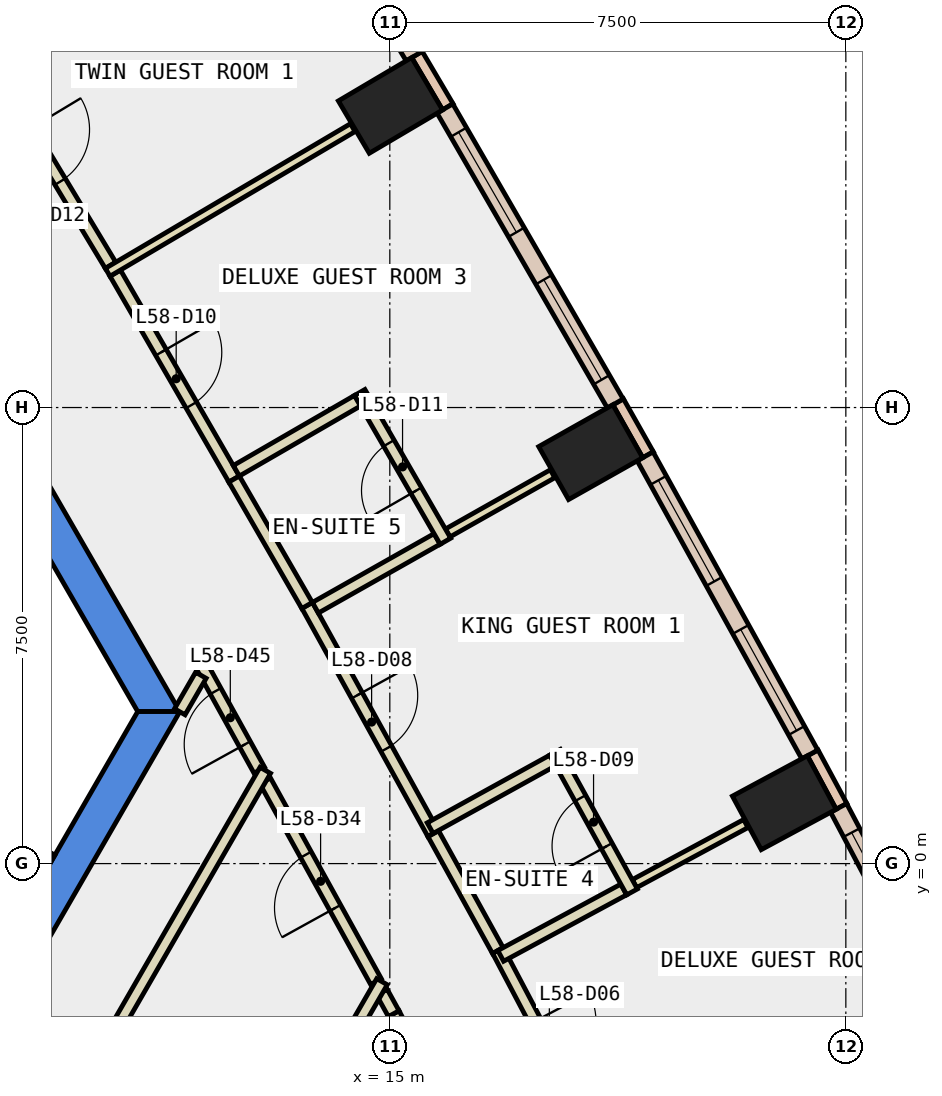
"""IFC4 building model, lengths in metres.
Left out: names, types, materials, properties, quantities, classifications, styles, units other than length and angle.
Written with IfcOpenShell. Run it as: python <this file> out.ifc"""

import sys

from ifc_helpers import new_model, si_unit, direction, frame, frame_2d, origin, origin_2d, place, context, subcontext, project, spatial, polyline, rectangle, outline, extrude, element, fill, save


model = new_model("IFC4")
c1 = context("Model", 3, precision=1e-05, world=origin(), true_north=direction((0.0, 1.0)))
c2 = subcontext(c1, "Body", "Model", "MODEL_VIEW")
j1 = project(units=[si_unit("LENGTHUNIT", "METRE"), si_unit("PLANEANGLEUNIT", "RADIAN")], contexts=[c1])
p1 = place(None, origin())
s1 = spatial("IfcSite", under=j1, at=p1, CompositionType="ELEMENT")
p2 = place(p1, origin())
s2 = spatial("IfcBuilding", under=s1, at=p2, CompositionType="ELEMENT")
p3 = place(p2, frame((0.0, 0.0, 255.8)))
s3 = spatial("IfcBuildingStorey", under=s2, at=p3, CompositionType="ELEMENT", Elevation=255.8)
for number, where, z_axis, x_axis in (
    (1, (21.488, 1.001, -0.34), (0.0, 0.0, 1.0), (-0.474, 0.881, 0.0)),
    (2, (18.304, 6.766, -0.34), (0.0, 0.0, 1.0), (-0.491, 0.871, 0.0)),
    (3, (15.011, 12.468, -0.34), (0.0, 0.0, 1.0), (-0.509, 0.861, 0.0)),
):
    element("IfcColumn", number, at=place(p3, frame(where, z_axis=z_axis, x_axis=x_axis)), inside=s3, PredefinedType="COLUMN", context=c2, shape_type="SweptSolid", body=[
        extrude(rectangle(XDim=1.0, YDim=1.4, at=origin_2d()), origin(), (0.0, 0.0, 1.0), 3.6),
    ])
p4 = place(p3, frame((0.0, 0.0, -0.34)))
e4 = element("IfcWall", 4, at=p4, inside=s3, PredefinedType="SHEAR", context=c2, shape_type="SweptSolid", body=[
    extrude(outline(polyline([(6.786, 10.747), (6.266, 10.447), (10.854, 2.5), (11.547, 2.5), (6.786, 10.747)])), origin(), (0.0, 0.0, 1.0), 3.6),
])
p5 = place(p3, frame((0.0, 0.0, -0.34)))
e5 = element("IfcWall", 5, at=p5, inside=s3, PredefinedType="SHEAR", context=c2, shape_type="SweptSolid", body=[
    extrude(outline(polyline([(5.774, -7.5), (11.547, 2.5), (10.854, 2.5), (5.427, -6.9), (5.774, -7.5)])), origin(), (0.0, 0.0, 1.0), 3.6),
])
for number, where, z_axis, x_axis in (
    (6, (22.429, 0.94, 0.0), (0.0, 0.0, 1.0), (-0.474, 0.881, 0.0)),
    (7, (19.247, 6.723, 0.0), (0.0, 0.0, 1.0), (-0.492, 0.871, 0.0)),
):
    element("IfcWall", number, at=place(p3, frame(where, z_axis=z_axis, x_axis=x_axis)), inside=s3, PredefinedType="STANDARD", context=c2, shape_type="SweptSolid", body=[
        extrude(rectangle(XDim=1.0, YDim=0.2, at=frame_2d((0.5, 0.0))), origin(), (0.0, 0.0, 1.0), 3.26),
    ])
p6 = place(p3, frame((15.954, 12.445, 0.0), z_axis=(0.0, 0.0, 1.0), x_axis=(-0.508268432768, 0.861198699634, 0.0)))
e8 = element("IfcWall", 8, at=p6, inside=s3, PredefinedType="STANDARD", context=c2, shape_type="SweptSolid", body=[
    extrude(rectangle(XDim=1.0, YDim=0.2, at=frame_2d((0.5, 0.0))), origin(), (0.0, 0.0, 1.0), 3.26),
])
p7 = place(p3, frame((25.012, -4.07, 0.0), z_axis=(0.0, 0.0, 1.0), x_axis=(-0.466663589714, 0.884434900959, 0.0)))
e9 = element("IfcWall", 9, at=p7, inside=s3, PredefinedType="STANDARD", context=c2, shape_type="SweptSolid", body=[
    extrude(rectangle(XDim=5.638, YDim=0.3, at=frame_2d((2.819, 0.0))), origin(), (0.0, 0.0, 1.0), 3.26),
])
p8 = place(p7, frame((0.459, 0.0, 0.9)))
e10 = element("IfcOpeningElement", 10, at=p8, cuts=e9, PredefinedType="OPENING", context=c2, shape_type="SweptSolid", body=[
    extrude(rectangle(XDim=1.9, YDim=2.0, at=frame_2d((0.95, 1.0))), frame((0.0, 0.16, 0.0), z_axis=(0.0, -1.0, 0.0), x_axis=(1.0, 0.0, 0.0)), (0.0, 0.0, 1.0), 0.32),
])
p9 = place(p7, frame((3.278, 0.0, 0.9)))
e11 = element("IfcOpeningElement", 11, at=p9, cuts=e9, PredefinedType="OPENING", context=c2, shape_type="SweptSolid", body=[
    extrude(rectangle(XDim=1.9, YDim=2.0, at=frame_2d((0.95, 1.0))), frame((0.0, 0.16, 0.0), z_axis=(0.0, -1.0, 0.0), x_axis=(1.0, 0.0, 0.0)), (0.0, 0.0, 1.0), 0.32),
])
p10 = place(p3, frame((21.907, 1.794, 0.0), z_axis=(0.0, 0.0, 1.0), x_axis=(-0.483469062695, 0.875361448441, 0.0)))
e12 = element("IfcWall", 12, at=p10, inside=s3, PredefinedType="STANDARD", context=c2, shape_type="SweptSolid", body=[
    extrude(rectangle(XDim=5.601, YDim=0.3, at=frame_2d((2.801, 0.0))), origin(), (0.0, 0.0, 1.0), 3.26),
])
p11 = place(p10, frame((0.45, 0.0, 0.9)))
e13 = element("IfcOpeningElement", 13, at=p11, cuts=e12, PredefinedType="OPENING", context=c2, shape_type="SweptSolid", body=[
    extrude(rectangle(XDim=1.9, YDim=2.0, at=frame_2d((0.95, 1.0))), frame((0.0, 0.16, 0.0), z_axis=(0.0, -1.0, 0.0), x_axis=(1.0, 0.0, 0.0)), (0.0, 0.0, 1.0), 0.32),
])
p12 = place(p10, frame((3.251, 0.0, 0.9)))
e14 = element("IfcOpeningElement", 14, at=p12, cuts=e12, PredefinedType="OPENING", context=c2, shape_type="SweptSolid", body=[
    extrude(rectangle(XDim=1.9, YDim=2.0, at=frame_2d((0.95, 1.0))), frame((0.0, 0.16, 0.0), z_axis=(0.0, -1.0, 0.0), x_axis=(1.0, 0.0, 0.0)), (0.0, 0.0, 1.0), 0.32),
])
p13 = place(p3, frame((18.708, 7.566, 0.0), z_axis=(0.0, 0.0, 1.0), x_axis=(-0.500089564757, 0.865973687372, 0.0)))
e15 = element("IfcWall", 15, at=p13, inside=s3, PredefinedType="STANDARD", context=c2, shape_type="SweptSolid", body=[
    extrude(rectangle(XDim=5.603, YDim=0.3, at=frame_2d((2.802, 0.0))), origin(), (0.0, 0.0, 1.0), 3.26),
])
p14 = place(p13, frame((0.451, 0.0, 0.9)))
e16 = element("IfcOpeningElement", 16, at=p14, cuts=e15, PredefinedType="OPENING", context=c2, shape_type="SweptSolid", body=[
    extrude(rectangle(XDim=1.9, YDim=2.0, at=frame_2d((0.95, 1.0))), frame((0.0, 0.16, 0.0), z_axis=(0.0, -1.0, 0.0), x_axis=(1.0, 0.0, 0.0)), (0.0, 0.0, 1.0), 0.32),
])
p15 = place(p13, frame((3.252, 0.0, 0.9)))
e17 = element("IfcOpeningElement", 17, at=p15, cuts=e15, PredefinedType="OPENING", context=c2, shape_type="SweptSolid", body=[
    extrude(rectangle(XDim=1.9, YDim=2.0, at=frame_2d((0.95, 1.0))), frame((0.0, 0.16, 0.0), z_axis=(0.0, -1.0, 0.0), x_axis=(1.0, 0.0, 0.0)), (0.0, 0.0, 1.0), 0.32),
])
p16 = place(p3, frame((15.399, 13.277, 0.0), z_axis=(0.0, 0.0, 1.0), x_axis=(-0.516269519619, 0.856426169096, 0.0)))
e18 = element("IfcWall", 18, at=p16, inside=s3, PredefinedType="STANDARD", context=c2, shape_type="SweptSolid", body=[
    extrude(rectangle(XDim=5.603, YDim=0.3, at=frame_2d((2.802, 0.0))), origin(), (0.0, 0.0, 1.0), 3.26),
])
p17 = place(p16, frame((0.451, 0.0, 0.9)))
e19 = element("IfcOpeningElement", 19, at=p17, cuts=e18, PredefinedType="OPENING", context=c2, shape_type="SweptSolid", body=[
    extrude(rectangle(XDim=1.9, YDim=2.0, at=frame_2d((0.95, 1.0))), frame((0.0, 0.16, 0.0), z_axis=(0.0, -1.0, 0.0), x_axis=(1.0, 0.0, 0.0)), (0.0, 0.0, 1.0), 0.32),
])
p18 = place(p16, frame((3.253, 0.0, 0.9)))
e20 = element("IfcOpeningElement", 20, at=p18, cuts=e18, PredefinedType="OPENING", context=c2, shape_type="SweptSolid", body=[
    extrude(rectangle(XDim=1.9, YDim=2.0, at=frame_2d((0.95, 1.0))), frame((0.0, 0.16, 0.0), z_axis=(0.0, -1.0, 0.0), x_axis=(1.0, 0.0, 0.0)), (0.0, 0.0, 1.0), 0.32),
])
p19 = place(p3, frame((12.854, 1.535, 0.0), z_axis=(0.0, 0.0, 1.0), x_axis=(-0.483730980407, 0.875216738068, 0.0)))
e21 = element("IfcWall", 21, at=p19, inside=s3, PredefinedType="PARTITIONING", context=c2, shape_type="SweptSolid", body=[
    extrude(rectangle(XDim=1.974, YDim=0.2, at=frame_2d((0.987, 0.0))), origin(), (0.0, 0.0, 1.0), 3.26),
])
p20 = place(p19, frame((0.487, 0.0, 0.0)))
e22 = element("IfcOpeningElement", 22, at=p20, cuts=e21, PredefinedType="OPENING", context=c2, shape_type="SweptSolid", body=[
    extrude(rectangle(XDim=1.0, YDim=2.1, at=frame_2d((0.5, 1.05))), frame((0.0, 0.11, 0.0), z_axis=(0.0, -1.0, 0.0), x_axis=(1.0, 0.0, 0.0)), (0.0, 0.0, 1.0), 0.22),
])
p21 = place(p3, frame((11.893, 3.097, 0.0), z_axis=(0.0, 0.0, 1.0), x_axis=(-0.500911294014, -0.865498628265, 0.0)))
e23 = element("IfcWall", 23, at=p21, inside=s3, PredefinedType="PARTITIONING", context=c2, shape_type="SweptSolid", body=[
    extrude(rectangle(XDim=0.693, YDim=0.2, at=frame_2d((0.347, 0.0))), origin(), (0.0, 0.0, 1.0), 3.26),
])
p22 = place(p3, frame((14.773, -1.941, 0.0), z_axis=(0.0, 0.0, 1.0), x_axis=(-0.483431586589, 0.875382145744, 0.0)))
e24 = element("IfcWall", 24, at=p22, inside=s3, PredefinedType="PARTITIONING", context=c2, shape_type="SweptSolid", body=[
    extrude(rectangle(XDim=3.771, YDim=0.2, at=frame_2d((1.885, 0.0))), origin(), (0.0, 0.0, 1.0), 3.26),
])
p23 = place(p22, frame((1.385, 0.0, 0.0)))
e25 = element("IfcOpeningElement", 25, at=p23, cuts=e24, PredefinedType="OPENING", context=c2, shape_type="SweptSolid", body=[
    extrude(rectangle(XDim=1.0, YDim=2.1, at=frame_2d((0.5, 1.05))), frame((0.0, 0.11, 0.0), z_axis=(0.0, -1.0, 0.0), x_axis=(1.0, 0.0, 0.0)), (0.0, 0.0, 1.0), 0.22),
])
p24 = place(p3, frame((16.667, -5.505, 0.0), z_axis=(0.0, 0.0, 1.0), x_axis=(-0.466812680399, 0.884356218624, 0.0)))
e26 = element("IfcWall", 26, at=p24, inside=s3, PredefinedType="PARTITIONING", context=c2, shape_type="SweptSolid", body=[
    extrude(rectangle(XDim=3.434, YDim=0.2, at=frame_2d((1.717, 0.0))), origin(), (0.0, 0.0, 1.0), 3.26),
])
p25 = place(p24, frame((1.217, 0.0, 0.0)))
e27 = element("IfcOpeningElement", 27, at=p25, cuts=e26, PredefinedType="OPENING", context=c2, shape_type="SweptSolid", body=[
    extrude(rectangle(XDim=1.0, YDim=2.1, at=frame_2d((0.5, 1.05))), frame((0.0, 0.11, 0.0), z_axis=(0.0, -1.0, 0.0), x_axis=(1.0, 0.0, 0.0)), (0.0, 0.0, 1.0), 0.22),
])
p26 = place(p3, frame((15.064, -2.468, 0.0), z_axis=(0.0, 0.0, 1.0), x_axis=(-0.482338449744, 0.875984942735, 0.0)))
e28 = element("IfcWall", 28, at=p26, inside=s3, PredefinedType="PARTITIONING", context=c2, shape_type="SweptSolid", body=[
    extrude(rectangle(XDim=0.402, YDim=0.2, at=frame_2d((0.201, 0.0))), origin(), (0.0, 0.0, 1.0), 3.26),
])
p27 = place(p3, frame((16.778, -1.429, 0.0), z_axis=(0.0, 0.0, 1.0), x_axis=(0.466493865945, -0.884524433261, 0.0)))
e29 = element("IfcWall", 29, at=p27, inside=s3, PredefinedType="PARTITIONING", context=c2, shape_type="SweptSolid", body=[
    extrude(rectangle(XDim=3.526, YDim=0.2, at=frame_2d((1.763, 0.0))), origin(), (0.0, 0.0, 1.0), 3.26),
])
p28 = place(p27, frame((1.313, 0.0, 0.0)))
e30 = element("IfcOpeningElement", 30, at=p28, cuts=e29, PredefinedType="OPENING", context=c2, shape_type="SweptSolid", body=[
    extrude(rectangle(XDim=1.0, YDim=2.1, at=frame_2d((0.5, 1.05))), frame((0.0, 0.11, 0.0), z_axis=(0.0, -1.0, 0.0), x_axis=(1.0, 0.0, 0.0)), (0.0, 0.0, 1.0), 0.22),
])
p29 = place(p3, frame((13.641, 4.246, 0.0), z_axis=(0.0, 0.0, 1.0), x_axis=(0.483405752983, -0.875396411909, 0.0)))
e31 = element("IfcWall", 31, at=p29, inside=s3, PredefinedType="PARTITIONING", context=c2, shape_type="SweptSolid", body=[
    extrude(rectangle(XDim=4.284, YDim=0.2, at=frame_2d((2.142, 0.0))), origin(), (0.0, 0.0, 1.0), 3.26),
])
p30 = place(p29, frame((1.692, 0.0, 0.0)))
e32 = element("IfcOpeningElement", 32, at=p30, cuts=e31, PredefinedType="OPENING", context=c2, shape_type="SweptSolid", body=[
    extrude(rectangle(XDim=1.0, YDim=2.1, at=frame_2d((0.5, 1.05))), frame((0.0, 0.11, 0.0), z_axis=(0.0, -1.0, 0.0), x_axis=(1.0, 0.0, 0.0)), (0.0, 0.0, 1.0), 0.22),
])
p31 = place(p3, frame((15.715, 0.491, 0.0), z_axis=(0.0, 0.0, 1.0), x_axis=(0.483421428323, -0.875387755591, 0.0)))
e33 = element("IfcWall", 33, at=p31, inside=s3, PredefinedType="PARTITIONING", context=c2, shape_type="SweptSolid", body=[
    extrude(rectangle(XDim=2.194, YDim=0.2, at=frame_2d((1.097, 0.0))), origin(), (0.0, 0.0, 1.0), 3.26),
])
p32 = place(p3, frame((10.484, 9.71, 0.0), z_axis=(0.0, 0.0, 1.0), x_axis=(0.500034145141, -0.866005689181, 0.0)))
e34 = element("IfcWall", 34, at=p32, inside=s3, PredefinedType="PARTITIONING", context=c2, shape_type="SweptSolid", body=[
    extrude(rectangle(XDim=3.91, YDim=0.2, at=frame_2d((1.955, 0.0))), origin(), (0.0, 0.0, 1.0), 3.26),
])
p33 = place(p32, frame((1.505, 0.0, 0.0)))
e35 = element("IfcOpeningElement", 35, at=p33, cuts=e34, PredefinedType="OPENING", context=c2, shape_type="SweptSolid", body=[
    extrude(rectangle(XDim=1.0, YDim=2.1, at=frame_2d((0.5, 1.05))), frame((0.0, 0.11, 0.0), z_axis=(0.0, -1.0, 0.0), x_axis=(1.0, 0.0, 0.0)), (0.0, 0.0, 1.0), 0.22),
])
p34 = place(p3, frame((12.439, 6.324, 0.0), z_axis=(0.0, 0.0, 1.0), x_axis=(0.499913221443, -0.866075499611, 0.0)))
e36 = element("IfcWall", 36, at=p34, inside=s3, PredefinedType="PARTITIONING", context=c2, shape_type="SweptSolid", body=[
    extrude(rectangle(XDim=2.4, YDim=0.2, at=frame_2d((1.2, 0.0))), origin(), (0.0, 0.0, 1.0), 3.26),
])
p35 = place(p3, frame((8.181, 13.532, 0.0), z_axis=(0.0, 0.0, 1.0), x_axis=(0.51625987265, -0.856431984393, 0.0)))
e37 = element("IfcWall", 37, at=p35, inside=s3, PredefinedType="PARTITIONING", context=c2, shape_type="SweptSolid", body=[
    extrude(rectangle(XDim=4.312, YDim=0.2, at=frame_2d((2.156, 0.0))), origin(), (0.0, 0.0, 1.0), 3.26),
])
p36 = place(p35, frame((1.706, 0.0, 0.0)))
e38 = element("IfcOpeningElement", 38, at=p36, cuts=e37, PredefinedType="OPENING", context=c2, shape_type="SweptSolid", body=[
    extrude(rectangle(XDim=1.0, YDim=2.1, at=frame_2d((0.5, 1.05))), frame((0.0, 0.11, 0.0), z_axis=(0.0, -1.0, 0.0), x_axis=(1.0, 0.0, 0.0)), (0.0, 0.0, 1.0), 0.22),
])
p37 = place(p3, frame((8.141, 0.801, 0.0), z_axis=(0.0, 0.0, 1.0), x_axis=(0.866434738017, -0.499290341141, 0.0)))
e39 = element("IfcWall", 39, at=p37, inside=s3, PredefinedType="PARTITIONING", context=c2, shape_type="SweptSolid", body=[
    extrude(rectangle(XDim=1.5, YDim=0.2, at=frame_2d((0.75, 0.0))), origin(), (0.0, 0.0, 1.0), 3.26),
])
p38 = place(p3, frame((9.285, -4.818, 0.0), z_axis=(0.0, 0.0, 1.0), x_axis=(0.499962569651, 0.866047013128, 0.0)))
e40 = element("IfcWall", 40, at=p38, inside=s3, PredefinedType="PARTITIONING", context=c2, shape_type="SweptSolid", body=[
    extrude(rectangle(XDim=7.334, YDim=0.2, at=frame_2d((3.667, 0.0))), origin(), (0.0, 0.0, 1.0), 3.26),
])
p39 = place(p3, frame((14.871, -1.942, 0.0), z_axis=(0.0, 0.0, 1.0), x_axis=(-0.50000507839, -0.866022471755, 0.0)))
e41 = element("IfcWall", 41, at=p39, inside=s3, PredefinedType="PARTITIONING", context=c2, shape_type="SweptSolid", body=[
    extrude(rectangle(XDim=5.284, YDim=0.2, at=frame_2d((2.642, 0.0))), origin(), (0.0, 0.0, 1.0), 3.26),
])
p40 = place(p3, frame((19.023, -0.33, 0.0), z_axis=(0.0, 0.0, 1.0), x_axis=(0.880158309515, 0.474680261009, 0.0)))
e42 = element("IfcWall", 42, at=p40, inside=s3, PredefinedType="PARTITIONING", context=c2, shape_type="SweptSolid", body=[
    extrude(rectangle(XDim=2.082, YDim=0.15, at=frame_2d((1.041, 0.0))), origin(), (0.0, 0.0, 1.0), 3.26),
])
p41 = place(p3, frame((16.824, -1.518, 0.0), z_axis=(0.0, 0.0, 1.0), x_axis=(0.87996932648, 0.475030508972, 0.0)))
e43 = element("IfcWall", 43, at=p41, inside=s3, PredefinedType="PARTITIONING", context=c2, shape_type="SweptSolid", body=[
    extrude(rectangle(XDim=2.299, YDim=0.2, at=frame_2d((1.149, 0.0))), origin(), (0.0, 0.0, 1.0), 3.26),
])
p42 = place(p3, frame((18.984, -0.466, 0.0), z_axis=(0.0, 0.0, 1.0), x_axis=(-0.482922337539, 0.875663186337, 0.0)))
e44 = element("IfcWall", 44, at=p42, inside=s3, PredefinedType="PARTITIONING", context=c2, shape_type="SweptSolid", body=[
    extrude(rectangle(XDim=2.623, YDim=0.2, at=frame_2d((1.312, 0.0))), origin(), (0.0, 0.0, 1.0), 3.26),
])
p43 = place(p42, frame((0.861, 0.0, 0.0)))
e45 = element("IfcOpeningElement", 45, at=p43, cuts=e44, PredefinedType="OPENING", context=c2, shape_type="SweptSolid", body=[
    extrude(rectangle(XDim=0.9, YDim=2.1, at=frame_2d((0.45, 1.05))), frame((0.0, 0.11, 0.0), z_axis=(0.0, -1.0, 0.0), x_axis=(1.0, 0.0, 0.0)), (0.0, 0.0, 1.0), 0.22),
])
p44 = place(p3, frame((17.677, 1.695, 0.0), z_axis=(0.0, 0.0, 1.0), x_axis=(-0.875306576455, -0.483568399727, 0.0)))
e46 = element("IfcWall", 46, at=p44, inside=s3, PredefinedType="PARTITIONING", context=c2, shape_type="SweptSolid", body=[
    extrude(rectangle(XDim=2.3, YDim=0.2, at=frame_2d((1.15, 0.0))), origin(), (0.0, 0.0, 1.0), 3.26),
])
p45 = place(p3, frame((15.952, 5.437, 0.0), z_axis=(0.0, 0.0, 1.0), x_axis=(0.870817501488, 0.491606427036, 0.0)))
e47 = element("IfcWall", 47, at=p45, inside=s3, PredefinedType="PARTITIONING", context=c2, shape_type="SweptSolid", body=[
    extrude(rectangle(XDim=1.981, YDim=0.15, at=frame_2d((0.99, 0.0))), origin(), (0.0, 0.0, 1.0), 3.26),
])
p46 = place(p3, frame((13.776, 4.208, 0.0), z_axis=(0.0, 0.0, 1.0), x_axis=(0.870669592898, 0.491868336044, 0.0)))
e48 = element("IfcWall", 48, at=p46, inside=s3, PredefinedType="PARTITIONING", context=c2, shape_type="SweptSolid", body=[
    extrude(rectangle(XDim=2.3, YDim=0.2, at=frame_2d((1.15, 0.0))), origin(), (0.0, 0.0, 1.0), 3.26),
])
p47 = place(p3, frame((15.915, 5.301, 0.0), z_axis=(0.0, 0.0, 1.0), x_axis=(-0.499709979351, 0.866192782547, 0.0)))
e49 = element("IfcWall", 49, at=p47, inside=s3, PredefinedType="PARTITIONING", context=c2, shape_type="SweptSolid", body=[
    extrude(rectangle(XDim=2.824, YDim=0.2, at=frame_2d((1.412, 0.0))), origin(), (0.0, 0.0, 1.0), 3.26),
])
p48 = place(p47, frame((0.962, 0.0, 0.0)))
e50 = element("IfcOpeningElement", 50, at=p48, cuts=e49, PredefinedType="OPENING", context=c2, shape_type="SweptSolid", body=[
    extrude(rectangle(XDim=0.9, YDim=2.1, at=frame_2d((0.45, 1.05))), frame((0.0, 0.11, 0.0), z_axis=(0.0, -1.0, 0.0), x_axis=(1.0, 0.0, 0.0)), (0.0, 0.0, 1.0), 0.22),
])
p49 = place(p3, frame((14.467, 7.611, 0.0), z_axis=(0.0, 0.0, 1.0), x_axis=(-0.865716862402, -0.500534028967, 0.0)))
e51 = element("IfcWall", 51, at=p49, inside=s3, PredefinedType="PARTITIONING", context=c2, shape_type="SweptSolid", body=[
    extrude(rectangle(XDim=2.3, YDim=0.2, at=frame_2d((1.15, 0.0))), origin(), (0.0, 0.0, 1.0), 3.26),
])
p50 = place(p3, frame((10.36, 9.724, 0.0), z_axis=(0.0, 0.0, 1.0), x_axis=(0.861211954005, 0.508245974188, 0.0)))
e52 = element("IfcWall", 52, at=p50, inside=s3, PredefinedType="PARTITIONING", context=c2, shape_type="SweptSolid", body=[
    extrude(rectangle(XDim=4.681, YDim=0.15, at=frame_2d((2.34, 0.0))), origin(), (0.0, 0.0, 1.0), 3.26),
])
p51 = place(p9, origin())
e53 = element("IfcWindow", 53, at=p51, inside=s3, PartitioningType="SINGLE_PANEL", PredefinedType="WINDOW", context=c2, shape_type="SweptSolid", body=[
    extrude(rectangle(XDim=1.9, YDim=2.0, at=frame_2d((0.95, 1.0))), frame((0.0, 0.03, 0.0), z_axis=(0.0, -1.0, 0.0), x_axis=(1.0, 0.0, 0.0)), (0.0, 0.0, 1.0), 0.06),
])
fill(e11, e53)
p52 = place(p11, origin())
e54 = element("IfcWindow", 54, at=p52, inside=s3, PartitioningType="SINGLE_PANEL", PredefinedType="WINDOW", context=c2, shape_type="SweptSolid", body=[
    extrude(rectangle(XDim=1.9, YDim=2.0, at=frame_2d((0.95, 1.0))), frame((0.0, 0.03, 0.0), z_axis=(0.0, -1.0, 0.0), x_axis=(1.0, 0.0, 0.0)), (0.0, 0.0, 1.0), 0.06),
])
fill(e13, e54)
p53 = place(p12, origin())
e55 = element("IfcWindow", 55, at=p53, inside=s3, PartitioningType="SINGLE_PANEL", PredefinedType="WINDOW", context=c2, shape_type="SweptSolid", body=[
    extrude(rectangle(XDim=1.9, YDim=2.0, at=frame_2d((0.95, 1.0))), frame((0.0, 0.03, 0.0), z_axis=(0.0, -1.0, 0.0), x_axis=(1.0, 0.0, 0.0)), (0.0, 0.0, 1.0), 0.06),
])
fill(e14, e55)
p54 = place(p14, origin())
e56 = element("IfcWindow", 56, at=p54, inside=s3, PartitioningType="SINGLE_PANEL", PredefinedType="WINDOW", context=c2, shape_type="SweptSolid", body=[
    extrude(rectangle(XDim=1.9, YDim=2.0, at=frame_2d((0.95, 1.0))), frame((0.0, 0.03, 0.0), z_axis=(0.0, -1.0, 0.0), x_axis=(1.0, 0.0, 0.0)), (0.0, 0.0, 1.0), 0.06),
])
fill(e16, e56)
p55 = place(p15, origin())
e57 = element("IfcWindow", 57, at=p55, inside=s3, PartitioningType="SINGLE_PANEL", PredefinedType="WINDOW", context=c2, shape_type="SweptSolid", body=[
    extrude(rectangle(XDim=1.9, YDim=2.0, at=frame_2d((0.95, 1.0))), frame((0.0, 0.03, 0.0), z_axis=(0.0, -1.0, 0.0), x_axis=(1.0, 0.0, 0.0)), (0.0, 0.0, 1.0), 0.06),
])
fill(e17, e57)
p56 = place(p30, origin())
e58 = element("IfcDoor", 58, at=p56, inside=s3, OperationType="SINGLE_SWING_RIGHT", PredefinedType="DOOR", context=c2, shape_type="SweptSolid", body=[
    extrude(rectangle(XDim=1.0, YDim=2.1, at=frame_2d((0.5, 1.05))), frame((0.0, 0.025, 0.0), z_axis=(0.0, -1.0, 0.0), x_axis=(1.0, 0.0, 0.0)), (0.0, 0.0, 1.0), 0.05),
])
fill(e32, e58)
p57 = place(p43, origin())
e59 = element("IfcDoor", 59, at=p57, inside=s3, OperationType="SINGLE_SWING_LEFT", PredefinedType="DOOR", context=c2, shape_type="SweptSolid", body=[
    extrude(rectangle(XDim=0.9, YDim=2.1, at=frame_2d((0.45, 1.05))), frame((0.0, 0.025, 0.0), z_axis=(0.0, -1.0, 0.0), x_axis=(1.0, 0.0, 0.0)), (0.0, 0.0, 1.0), 0.05),
])
fill(e45, e59)
p58 = place(p33, origin())
e60 = element("IfcDoor", 60, at=p58, inside=s3, OperationType="SINGLE_SWING_LEFT", PredefinedType="DOOR", context=c2, shape_type="SweptSolid", body=[
    extrude(rectangle(XDim=1.0, YDim=2.1, at=frame_2d((0.5, 1.05))), frame((0.0, 0.025, 0.0), z_axis=(0.0, -1.0, 0.0), x_axis=(1.0, 0.0, 0.0)), (0.0, 0.0, 1.0), 0.05),
])
fill(e35, e60)
p59 = place(p48, origin())
e61 = element("IfcDoor", 61, at=p59, inside=s3, OperationType="SINGLE_SWING_LEFT", PredefinedType="DOOR", context=c2, shape_type="SweptSolid", body=[
    extrude(rectangle(XDim=0.9, YDim=2.1, at=frame_2d((0.45, 1.05))), frame((0.0, 0.025, 0.0), z_axis=(0.0, -1.0, 0.0), x_axis=(1.0, 0.0, 0.0)), (0.0, 0.0, 1.0), 0.05),
])
fill(e50, e61)
p60 = place(p36, origin())
e62 = element("IfcDoor", 62, at=p60, inside=s3, OperationType="SINGLE_SWING_LEFT", PredefinedType="DOOR", context=c2, shape_type="SweptSolid", body=[
    extrude(rectangle(XDim=1.0, YDim=2.1, at=frame_2d((0.5, 1.05))), frame((0.0, 0.025, 0.0), z_axis=(0.0, -1.0, 0.0), x_axis=(1.0, 0.0, 0.0)), (0.0, 0.0, 1.0), 0.05),
])
fill(e38, e62)
p61 = place(p23, origin())
e63 = element("IfcDoor", 63, at=p61, inside=s3, OperationType="SINGLE_SWING_LEFT", PredefinedType="DOOR", context=c2, shape_type="SweptSolid", body=[
    extrude(rectangle(XDim=1.0, YDim=2.1, at=frame_2d((0.5, 1.05))), frame((0.0, 0.025, 0.0), z_axis=(0.0, -1.0, 0.0), x_axis=(1.0, 0.0, 0.0)), (0.0, 0.0, 1.0), 0.05),
])
fill(e25, e63)
p62 = place(p20, origin())
e64 = element("IfcDoor", 64, at=p62, inside=s3, OperationType="SINGLE_SWING_LEFT", PredefinedType="DOOR", context=c2, shape_type="SweptSolid", body=[
    extrude(rectangle(XDim=1.0, YDim=2.1, at=frame_2d((0.5, 1.05))), frame((0.0, 0.025, 0.0), z_axis=(0.0, -1.0, 0.0), x_axis=(1.0, 0.0, 0.0)), (0.0, 0.0, 1.0), 0.05),
])
fill(e22, e64)
save(model, sys.argv[1])
